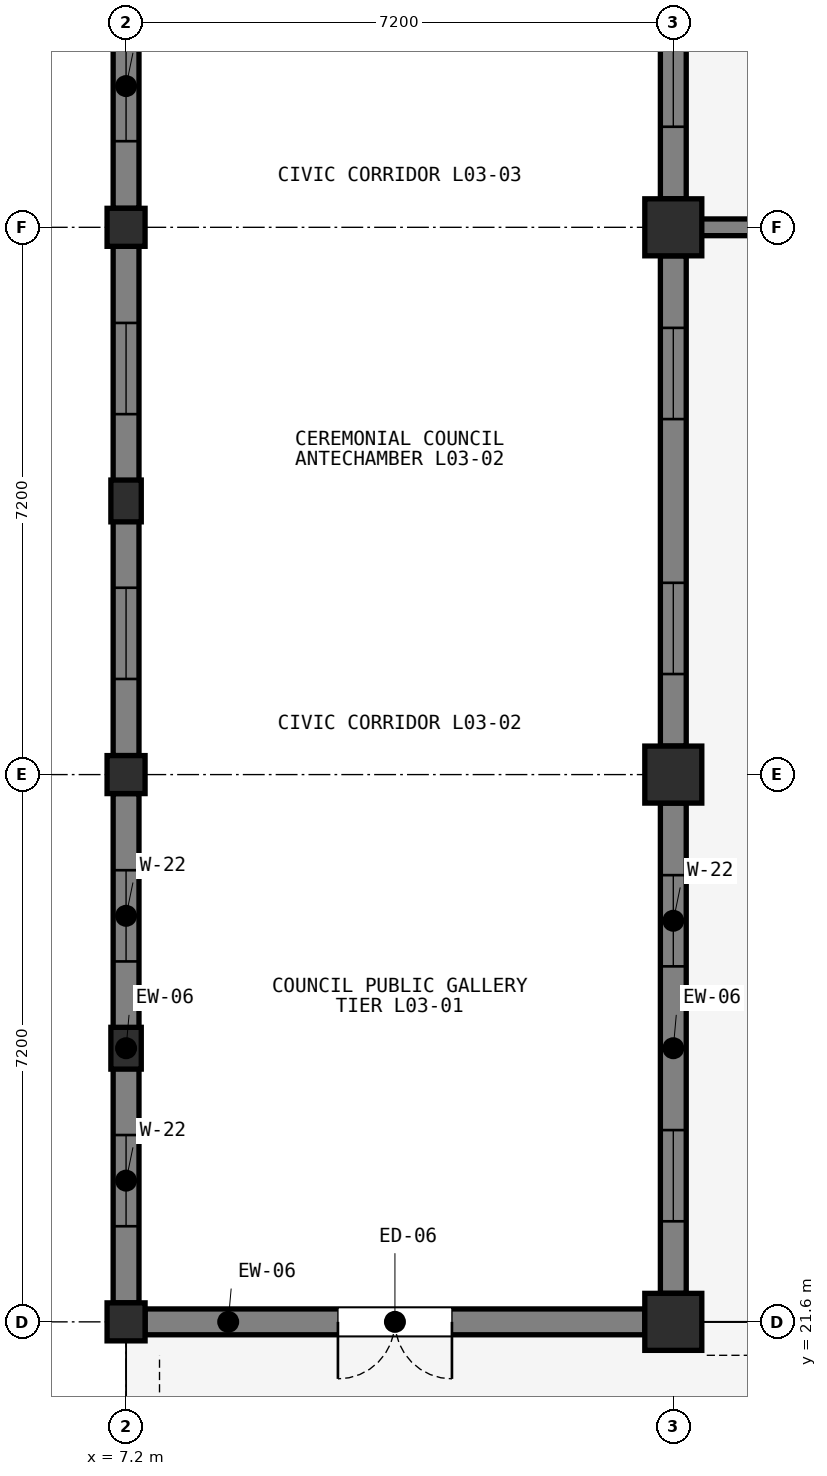
"""IFC4 building model, lengths in metres.
Left out: names, types, materials, properties, quantities, classifications, styles, units other than length and angle.
Written with IfcOpenShell. Run it as: python <this file> out.ifc"""

import sys

from ifc_helpers import new_model, si_unit, direction, frame, frame_2d, origin, origin_2d, place, context, subcontext, project, spatial, rectangle, extrude, element, fill, save


model = new_model("IFC4")
c1 = context("Model", 3, precision=1e-05, world=origin(), true_north=direction((0.0, 1.0)))
c2 = subcontext(c1, "Body", "Model", "MODEL_VIEW")
j1 = project(units=[si_unit("LENGTHUNIT", "METRE"), si_unit("PLANEANGLEUNIT", "RADIAN")], contexts=[c1])
p1 = place(None, origin())
s1 = spatial("IfcSite", under=j1, at=p1, CompositionType="ELEMENT")
p2 = place(p1, origin())
s2 = spatial("IfcBuilding", under=s1, at=p2, CompositionType="ELEMENT")
p3 = place(p2, frame((0.0, 0.0, 9.9)))
s3 = spatial("IfcBuildingStorey", under=s2, at=p3, CompositionType="ELEMENT", Elevation=9.9)
for number, where, z_axis, x_axis in (
    (1, (7.2, 21.6, 0.0), (0.0, 0.0, 1.0), (1.0, 0.0, 0.0)),
    (2, (7.2, 28.8, 0.0), (0.0, 0.0, 1.0), (1.0, 0.0, 0.0)),
    (3, (7.2, 36.0, 0.0), (0.0, 0.0, 1.0), (1.0, 0.0, 0.0)),
):
    element("IfcColumn", number, at=place(p3, frame(where, z_axis=z_axis, x_axis=x_axis)), inside=s3, PredefinedType="COLUMN", context=c2, shape_type="SweptSolid", body=[
        extrude(rectangle(XDim=0.5, YDim=0.5, at=origin_2d()), origin(), (0.0, 0.0, 1.0), 4.2),
    ])
for number, where, z_axis, x_axis in (
    (4, (14.4, 21.6, 0.0), (0.0, 0.0, 1.0), (1.0, 0.0, 0.0)),
    (5, (14.4, 28.8, 0.0), (0.0, 0.0, 1.0), (1.0, 0.0, 0.0)),
    (6, (14.4, 36.0, 0.0), (0.0, 0.0, 1.0), (1.0, 0.0, 0.0)),
):
    element("IfcColumn", number, at=place(p3, frame(where, z_axis=z_axis, x_axis=x_axis)), inside=s3, PredefinedType="COLUMN", context=c2, shape_type="SweptSolid", body=[
        extrude(rectangle(XDim=0.75, YDim=0.75, at=origin_2d()), origin(), (0.0, 0.0, 1.0), 4.2),
    ])
for number, where, z_axis, x_axis in (
    (7, (7.2, 25.2, 0.0), (0.0, 0.0, 1.0), (1.0, 0.0, 0.0)),
    (8, (7.2, 32.4, 0.0), (0.0, 0.0, 1.0), (1.0, 0.0, 0.0)),
):
    element("IfcColumn", number, at=place(p3, frame(where, z_axis=z_axis, x_axis=x_axis)), inside=s3, PredefinedType="PILASTER", context=c2, shape_type="SweptSolid", body=[
        extrude(rectangle(XDim=0.4, YDim=0.55, at=origin_2d()), origin(), (0.0, 0.0, 1.0), 4.2),
    ])
p4 = place(p3, frame((14.025, 21.6, 0.0), z_axis=(0.0, 0.0, 1.0), x_axis=(-1.0, 0.0, 0.0)))
e9 = element("IfcWall", 9, at=p4, inside=s3, PredefinedType="SOLIDWALL", context=c2, shape_type="SweptSolid", body=[
    extrude(rectangle(XDim=6.575, YDim=0.34, at=frame_2d((3.288, 0.0))), origin(), (0.0, 0.0, 1.0), 3.398),
])
p5 = place(p4, frame((2.538, 0.0, 0.0)))
e10 = element("IfcOpeningElement", 10, at=p5, cuts=e9, PredefinedType="OPENING", context=c2, shape_type="SweptSolid", body=[
    extrude(rectangle(XDim=1.5, YDim=2.25, at=frame_2d((0.75, 1.125))), frame((0.0, 0.18, 0.0), z_axis=(0.0, -1.0, 0.0), x_axis=(1.0, 0.0, 0.0)), (0.0, 0.0, 1.0), 0.36),
])
p6 = place(p3, frame((7.2, 21.85, 0.0), z_axis=(0.0, 0.0, 1.0), x_axis=(0.0, 1.0, 0.0)))
e11 = element("IfcWall", 11, at=p6, inside=s3, PredefinedType="SOLIDWALL", context=c2, shape_type="SweptSolid", body=[
    extrude(rectangle(XDim=6.7, YDim=0.34, at=frame_2d((3.35, 0.0))), origin(), (0.0, 0.0, 1.0), 3.467),
])
p7 = place(p6, frame((1.008, 0.0, 0.95)))
e12 = element("IfcOpeningElement", 12, at=p7, cuts=e11, PredefinedType="OPENING", context=c2, shape_type="SweptSolid", body=[
    extrude(rectangle(XDim=1.2, YDim=1.7, at=frame_2d((0.6, 0.85))), frame((0.0, 0.18, 0.0), z_axis=(0.0, -1.0, 0.0), x_axis=(1.0, 0.0, 0.0)), (0.0, 0.0, 1.0), 0.36),
])
p8 = place(p6, frame((4.492, 0.0, 0.95)))
e13 = element("IfcOpeningElement", 13, at=p8, cuts=e11, PredefinedType="OPENING", context=c2, shape_type="SweptSolid", body=[
    extrude(rectangle(XDim=1.2, YDim=1.7, at=frame_2d((0.6, 0.85))), frame((0.0, 0.18, 0.0), z_axis=(0.0, -1.0, 0.0), x_axis=(1.0, 0.0, 0.0)), (0.0, 0.0, 1.0), 0.36),
])
p9 = place(p3, frame((14.4, 28.425, 0.0), z_axis=(0.0, 0.0, 1.0), x_axis=(0.0, -1.0, 0.0)))
e14 = element("IfcWall", 14, at=p9, inside=s3, PredefinedType="SOLIDWALL", context=c2, shape_type="SweptSolid", body=[
    extrude(rectangle(XDim=6.45, YDim=0.34, at=frame_2d((3.225, 0.0))), origin(), (0.0, 0.0, 1.0), 3.35),
])
p10 = place(p9, frame((0.948, 0.0, 0.95)))
e15 = element("IfcOpeningElement", 15, at=p10, cuts=e14, PredefinedType="OPENING", context=c2, shape_type="SweptSolid", body=[
    extrude(rectangle(XDim=1.2, YDim=1.7, at=frame_2d((0.6, 0.85))), frame((0.0, 0.18, 0.0), z_axis=(0.0, -1.0, 0.0), x_axis=(1.0, 0.0, 0.0)), (0.0, 0.0, 1.0), 0.36),
])
p11 = place(p9, frame((4.302, 0.0, 0.95)))
e16 = element("IfcOpeningElement", 16, at=p11, cuts=e14, PredefinedType="OPENING", context=c2, shape_type="SweptSolid", body=[
    extrude(rectangle(XDim=1.2, YDim=1.7, at=frame_2d((0.6, 0.85))), frame((0.0, 0.18, 0.0), z_axis=(0.0, -1.0, 0.0), x_axis=(1.0, 0.0, 0.0)), (0.0, 0.0, 1.0), 0.36),
])
p12 = place(p3, frame((7.2, 29.05, 0.0), z_axis=(0.0, 0.0, 1.0), x_axis=(0.0, 1.0, 0.0)))
e17 = element("IfcWall", 17, at=p12, inside=s3, PredefinedType="SOLIDWALL", context=c2, shape_type="SweptSolid", body=[
    extrude(rectangle(XDim=6.7, YDim=0.34, at=frame_2d((3.35, 0.0))), origin(), (0.0, 0.0, 1.0), 3.467),
])
p13 = place(p12, frame((1.008, 0.0, 0.95)))
e18 = element("IfcOpeningElement", 18, at=p13, cuts=e17, PredefinedType="OPENING", context=c2, shape_type="SweptSolid", body=[
    extrude(rectangle(XDim=1.2, YDim=1.7, at=frame_2d((0.6, 0.85))), frame((0.0, 0.18, 0.0), z_axis=(0.0, -1.0, 0.0), x_axis=(1.0, 0.0, 0.0)), (0.0, 0.0, 1.0), 0.36),
])
p14 = place(p12, frame((4.492, 0.0, 0.95)))
e19 = element("IfcOpeningElement", 19, at=p14, cuts=e17, PredefinedType="OPENING", context=c2, shape_type="SweptSolid", body=[
    extrude(rectangle(XDim=1.2, YDim=1.7, at=frame_2d((0.6, 0.85))), frame((0.0, 0.18, 0.0), z_axis=(0.0, -1.0, 0.0), x_axis=(1.0, 0.0, 0.0)), (0.0, 0.0, 1.0), 0.36),
])
p15 = place(p3, frame((14.4, 35.625, 0.0), z_axis=(0.0, 0.0, 1.0), x_axis=(0.0, -1.0, 0.0)))
e20 = element("IfcWall", 20, at=p15, inside=s3, PredefinedType="SOLIDWALL", context=c2, shape_type="SweptSolid", body=[
    extrude(rectangle(XDim=6.45, YDim=0.34, at=frame_2d((3.225, 0.0))), origin(), (0.0, 0.0, 1.0), 3.35),
])
p16 = place(p15, frame((0.948, 0.0, 0.95)))
e21 = element("IfcOpeningElement", 21, at=p16, cuts=e20, PredefinedType="OPENING", context=c2, shape_type="SweptSolid", body=[
    extrude(rectangle(XDim=1.2, YDim=1.7, at=frame_2d((0.6, 0.85))), frame((0.0, 0.18, 0.0), z_axis=(0.0, -1.0, 0.0), x_axis=(1.0, 0.0, 0.0)), (0.0, 0.0, 1.0), 0.36),
])
p17 = place(p15, frame((4.302, 0.0, 0.95)))
e22 = element("IfcOpeningElement", 22, at=p17, cuts=e20, PredefinedType="OPENING", context=c2, shape_type="SweptSolid", body=[
    extrude(rectangle(XDim=1.2, YDim=1.7, at=frame_2d((0.6, 0.85))), frame((0.0, 0.18, 0.0), z_axis=(0.0, -1.0, 0.0), x_axis=(1.0, 0.0, 0.0)), (0.0, 0.0, 1.0), 0.36),
])
p18 = place(p3, frame((7.2, 36.25, 0.0), z_axis=(0.0, 0.0, 1.0), x_axis=(0.0, 1.0, 0.0)))
e23 = element("IfcWall", 23, at=p18, inside=s3, PredefinedType="SOLIDWALL", context=c2, shape_type="SweptSolid", body=[
    extrude(rectangle(XDim=6.7, YDim=0.34, at=frame_2d((3.35, 0.0))), origin(), (0.0, 0.0, 1.0), 3.467),
])
p19 = place(p18, frame((0.883, 0.0, 0.95)))
e24 = element("IfcOpeningElement", 24, at=p19, cuts=e23, PredefinedType="OPENING", context=c2, shape_type="SweptSolid", body=[
    extrude(rectangle(XDim=1.45, YDim=2.15, at=frame_2d((0.725, 1.075))), frame((0.0, 0.18, 0.0), z_axis=(0.0, -1.0, 0.0), x_axis=(1.0, 0.0, 0.0)), (0.0, 0.0, 1.0), 0.36),
])
p20 = place(p18, frame((4.367, 0.0, 0.95)))
e25 = element("IfcOpeningElement", 25, at=p20, cuts=e23, PredefinedType="OPENING", context=c2, shape_type="SweptSolid", body=[
    extrude(rectangle(XDim=1.45, YDim=2.15, at=frame_2d((0.725, 1.075))), frame((0.0, 0.18, 0.0), z_axis=(0.0, -1.0, 0.0), x_axis=(1.0, 0.0, 0.0)), (0.0, 0.0, 1.0), 0.36),
])
p21 = place(p3, frame((14.4, 42.825, 0.0), z_axis=(0.0, 0.0, 1.0), x_axis=(0.0, -1.0, 0.0)))
e26 = element("IfcWall", 26, at=p21, inside=s3, PredefinedType="SOLIDWALL", context=c2, shape_type="SweptSolid", body=[
    extrude(rectangle(XDim=6.45, YDim=0.34, at=frame_2d((3.225, 0.0))), origin(), (0.0, 0.0, 1.0), 3.35),
])
p22 = place(p21, frame((0.948, 0.0, 0.95)))
e27 = element("IfcOpeningElement", 27, at=p22, cuts=e26, PredefinedType="OPENING", context=c2, shape_type="SweptSolid", body=[
    extrude(rectangle(XDim=1.2, YDim=1.7, at=frame_2d((0.6, 0.85))), frame((0.0, 0.18, 0.0), z_axis=(0.0, -1.0, 0.0), x_axis=(1.0, 0.0, 0.0)), (0.0, 0.0, 1.0), 0.36),
])
p23 = place(p21, frame((4.302, 0.0, 0.95)))
e28 = element("IfcOpeningElement", 28, at=p23, cuts=e26, PredefinedType="OPENING", context=c2, shape_type="SweptSolid", body=[
    extrude(rectangle(XDim=1.2, YDim=1.7, at=frame_2d((0.6, 0.85))), frame((0.0, 0.18, 0.0), z_axis=(0.0, -1.0, 0.0), x_axis=(1.0, 0.0, 0.0)), (0.0, 0.0, 1.0), 0.36),
])
p24 = place(p3, frame((21.45, 36.0, 0.0), z_axis=(0.0, 0.0, 1.0), x_axis=(-1.0, 0.0, 0.0)))
e29 = element("IfcWall", 29, at=p24, inside=s3, PredefinedType="PARAPET", context=c2, shape_type="SweptSolid", body=[
    extrude(rectangle(XDim=6.9, YDim=0.22, at=frame_2d((3.45, 0.0))), origin(), (0.0, 0.0, 1.0), 0.85),
])
p25 = place(p5, origin())
e30 = element("IfcDoor", 30, at=p25, inside=s3, OperationType="DOUBLE_DOOR_SINGLE_SWING", PredefinedType="DOOR", context=c2, shape_type="SweptSolid", body=[
    extrude(rectangle(XDim=1.5, YDim=2.25, at=frame_2d((0.75, 1.125))), frame((0.0, 0.025, 0.0), z_axis=(0.0, -1.0, 0.0), x_axis=(1.0, 0.0, 0.0)), (0.0, 0.0, 1.0), 0.05),
])
fill(e10, e30)
p26 = place(p7, origin())
e31 = element("IfcWindow", 31, at=p26, inside=s3, PartitioningType="SINGLE_PANEL", PredefinedType="WINDOW", context=c2, shape_type="SweptSolid", body=[
    extrude(rectangle(XDim=1.2, YDim=1.7, at=frame_2d((0.6, 0.85))), frame((0.0, 0.03, 0.0), z_axis=(0.0, -1.0, 0.0), x_axis=(1.0, 0.0, 0.0)), (0.0, 0.0, 1.0), 0.06),
])
fill(e12, e31)
p27 = place(p8, origin())
e32 = element("IfcWindow", 32, at=p27, inside=s3, PartitioningType="SINGLE_PANEL", PredefinedType="WINDOW", context=c2, shape_type="SweptSolid", body=[
    extrude(rectangle(XDim=1.2, YDim=1.7, at=frame_2d((0.6, 0.85))), frame((0.0, 0.03, 0.0), z_axis=(0.0, -1.0, 0.0), x_axis=(1.0, 0.0, 0.0)), (0.0, 0.0, 1.0), 0.06),
])
fill(e13, e32)
p28 = place(p10, origin())
e33 = element("IfcWindow", 33, at=p28, inside=s3, PartitioningType="SINGLE_PANEL", PredefinedType="WINDOW", context=c2, shape_type="SweptSolid", body=[
    extrude(rectangle(XDim=1.2, YDim=1.7, at=frame_2d((0.6, 0.85))), frame((0.0, 0.03, 0.0), z_axis=(0.0, -1.0, 0.0), x_axis=(1.0, 0.0, 0.0)), (0.0, 0.0, 1.0), 0.06),
])
fill(e15, e33)
p29 = place(p11, origin())
e34 = element("IfcWindow", 34, at=p29, inside=s3, PartitioningType="SINGLE_PANEL", PredefinedType="WINDOW", context=c2, shape_type="SweptSolid", body=[
    extrude(rectangle(XDim=1.2, YDim=1.7, at=frame_2d((0.6, 0.85))), frame((0.0, 0.03, 0.0), z_axis=(0.0, -1.0, 0.0), x_axis=(1.0, 0.0, 0.0)), (0.0, 0.0, 1.0), 0.06),
])
fill(e16, e34)
p30 = place(p13, origin())
e35 = element("IfcWindow", 35, at=p30, inside=s3, PartitioningType="SINGLE_PANEL", PredefinedType="WINDOW", context=c2, shape_type="SweptSolid", body=[
    extrude(rectangle(XDim=1.2, YDim=1.7, at=frame_2d((0.6, 0.85))), frame((0.0, 0.03, 0.0), z_axis=(0.0, -1.0, 0.0), x_axis=(1.0, 0.0, 0.0)), (0.0, 0.0, 1.0), 0.06),
])
fill(e18, e35)
p31 = place(p14, origin())
e36 = element("IfcWindow", 36, at=p31, inside=s3, PartitioningType="SINGLE_PANEL", PredefinedType="WINDOW", context=c2, shape_type="SweptSolid", body=[
    extrude(rectangle(XDim=1.2, YDim=1.7, at=frame_2d((0.6, 0.85))), frame((0.0, 0.03, 0.0), z_axis=(0.0, -1.0, 0.0), x_axis=(1.0, 0.0, 0.0)), (0.0, 0.0, 1.0), 0.06),
])
fill(e19, e36)
p32 = place(p16, origin())
e37 = element("IfcWindow", 37, at=p32, inside=s3, PartitioningType="SINGLE_PANEL", PredefinedType="WINDOW", context=c2, shape_type="SweptSolid", body=[
    extrude(rectangle(XDim=1.2, YDim=1.7, at=frame_2d((0.6, 0.85))), frame((0.0, 0.03, 0.0), z_axis=(0.0, -1.0, 0.0), x_axis=(1.0, 0.0, 0.0)), (0.0, 0.0, 1.0), 0.06),
])
fill(e21, e37)
p33 = place(p17, origin())
e38 = element("IfcWindow", 38, at=p33, inside=s3, PartitioningType="SINGLE_PANEL", PredefinedType="WINDOW", context=c2, shape_type="SweptSolid", body=[
    extrude(rectangle(XDim=1.2, YDim=1.7, at=frame_2d((0.6, 0.85))), frame((0.0, 0.03, 0.0), z_axis=(0.0, -1.0, 0.0), x_axis=(1.0, 0.0, 0.0)), (0.0, 0.0, 1.0), 0.06),
])
fill(e22, e38)
p34 = place(p19, origin())
e39 = element("IfcWindow", 39, at=p34, inside=s3, PartitioningType="SINGLE_PANEL", PredefinedType="WINDOW", context=c2, shape_type="SweptSolid", body=[
    extrude(rectangle(XDim=1.45, YDim=2.15, at=frame_2d((0.725, 1.075))), frame((0.0, 0.03, 0.0), z_axis=(0.0, -1.0, 0.0), x_axis=(1.0, 0.0, 0.0)), (0.0, 0.0, 1.0), 0.06),
])
fill(e24, e39)
p35 = place(p23, origin())
e40 = element("IfcWindow", 40, at=p35, inside=s3, PartitioningType="SINGLE_PANEL", PredefinedType="WINDOW", context=c2, shape_type="SweptSolid", body=[
    extrude(rectangle(XDim=1.2, YDim=1.7, at=frame_2d((0.6, 0.85))), frame((0.0, 0.03, 0.0), z_axis=(0.0, -1.0, 0.0), x_axis=(1.0, 0.0, 0.0)), (0.0, 0.0, 1.0), 0.06),
])
fill(e28, e40)
save(model, sys.argv[1])
